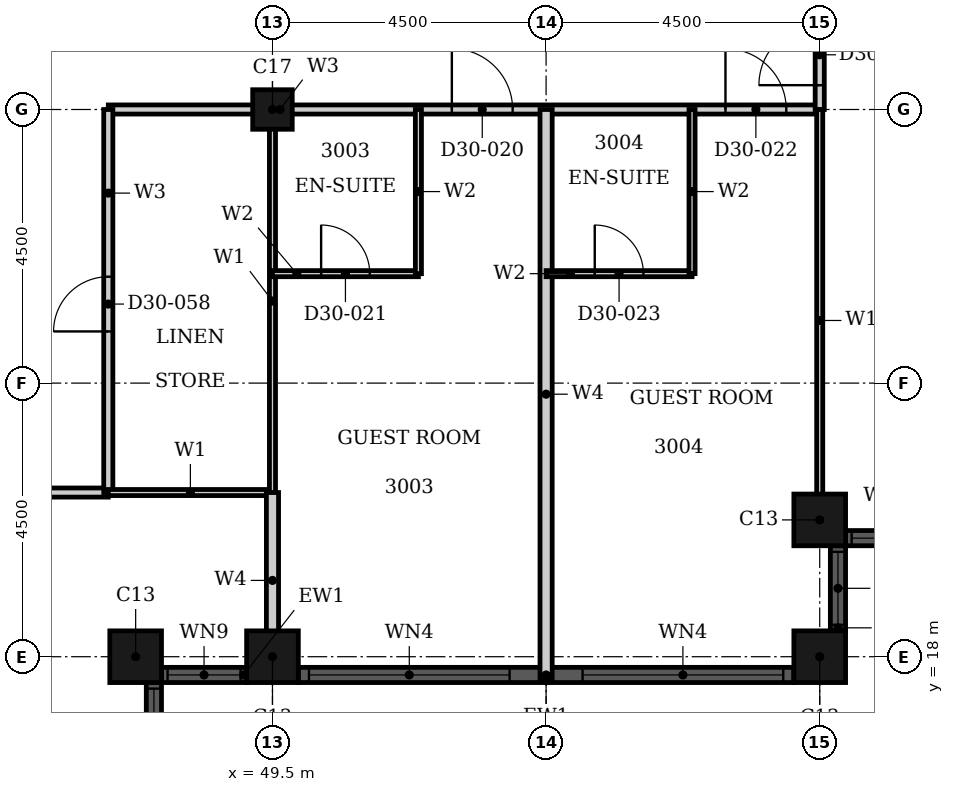
"""IFC4 building model, lengths in metres.
Left out: names, types, materials, properties, quantities, classifications, styles, units other than length and angle.
Written with IfcOpenShell. Run it as: python <this file> out.ifc"""

import sys

from ifc_helpers import new_model, si_unit, direction, frame, frame_2d, origin, origin_2d, place, context, subcontext, project, spatial, rectangle, hollow_rectangle, extrude, element, fill, save


model = new_model("IFC4")
c1 = context("Model", 3, precision=1e-05, world=origin(), true_north=direction((0.0, 1.0)))
c2 = subcontext(c1, "Body", "Model", "MODEL_VIEW")
j1 = project(units=[si_unit("LENGTHUNIT", "METRE"), si_unit("PLANEANGLEUNIT", "RADIAN")], contexts=[c1])
p1 = place(None, origin())
s1 = spatial("IfcSite", under=j1, at=p1, CompositionType="ELEMENT")
p2 = place(p1, origin())
s2 = spatial("IfcBuilding", under=s1, at=p2, CompositionType="ELEMENT")
p3 = place(p2, frame((0.0, 0.0, 122.4)))
s3 = spatial("IfcBuildingStorey", under=s2, at=p3, CompositionType="ELEMENT", Elevation=122.4)
for number, where, z_axis, x_axis in (
    (1, (47.25, 18.0, 0.0), (0.0, 0.0, 1.0), (1.0, 0.0, 0.0)),
    (2, (49.5, 18.0, 0.0), (0.0, 0.0, 1.0), (1.0, 0.0, 0.0)),
    (3, (58.5, 18.0, 0.0), (0.0, 0.0, 1.0), (1.0, 0.0, 0.0)),
    (4, (58.5, 20.25, 0.0), (0.0, 0.0, 1.0), (1.0, 0.0, 0.0)),
):
    element("IfcColumn", number, at=place(p3, frame(where, z_axis=z_axis, x_axis=x_axis)), inside=s3, PredefinedType="COLUMN", context=c2, shape_type="SweptSolid", body=[
        extrude(hollow_rectangle(XDim=0.85, YDim=0.85, WallThickness=0.026, at=origin_2d()), origin(), (0.0, 0.0, 1.0), 3.6),
    ])
p4 = place(p3, frame((49.5, 27.0, 0.0), z_axis=(0.0, 0.0, 1.0), x_axis=(1.0, 0.0, 0.0)))
e5 = element("IfcColumn", 5, at=p4, inside=s3, PredefinedType="COLUMN", context=c2, shape_type="SweptSolid", body=[
    extrude(hollow_rectangle(XDim=0.65, YDim=0.65, WallThickness=0.021, at=origin_2d()), origin(), (0.0, 0.0, 1.0), 3.6),
])
p5 = place(p3, frame((47.55, 16.175, 0.0), z_axis=(0.0, 0.0, 1.0), x_axis=(0.0, 1.0, 0.0)))
e6 = element("IfcWall", 6, at=p5, inside=s3, PredefinedType="SOLIDWALL", context=c2, shape_type="SweptSolid", body=[
    extrude(rectangle(XDim=1.4, YDim=0.25, at=frame_2d((0.7, 0.0))), origin(), (0.0, 0.0, 1.0), 3.6),
])
p6 = place(p5, frame((0.1, 0.0, 0.9)))
e7 = element("IfcOpeningElement", 7, at=p6, cuts=e6, PredefinedType="OPENING", context=c2, shape_type="SweptSolid", body=[
    extrude(rectangle(XDim=1.2, YDim=2.08, at=frame_2d((0.6, 1.04))), frame((0.0, 0.135, 0.0), z_axis=(0.0, -1.0, 0.0), x_axis=(1.0, 0.0, 0.0)), (0.0, 0.0, 1.0), 0.27),
])
p7 = place(p3, frame((47.675, 17.7, 0.0), z_axis=(0.0, 0.0, 1.0), x_axis=(1.0, 0.0, 0.0)))
e8 = element("IfcWall", 8, at=p7, inside=s3, PredefinedType="SOLIDWALL", context=c2, shape_type="SweptSolid", body=[
    extrude(rectangle(XDim=1.4, YDim=0.25, at=frame_2d((0.7, 0.0))), origin(), (0.0, 0.0, 1.0), 3.6),
])
p8 = place(p7, frame((0.1, 0.0, 0.9)))
e9 = element("IfcOpeningElement", 9, at=p8, cuts=e8, PredefinedType="OPENING", context=c2, shape_type="SweptSolid", body=[
    extrude(rectangle(XDim=1.2, YDim=2.08, at=frame_2d((0.6, 1.04))), frame((0.0, 0.135, 0.0), z_axis=(0.0, -1.0, 0.0), x_axis=(1.0, 0.0, 0.0)), (0.0, 0.0, 1.0), 0.27),
])
p9 = place(p3, frame((49.925, 17.7, 0.0), z_axis=(0.0, 0.0, 1.0), x_axis=(1.0, 0.0, 0.0)))
e10 = element("IfcWall", 10, at=p9, inside=s3, PredefinedType="SOLIDWALL", context=c2, shape_type="SweptSolid", body=[
    extrude(rectangle(XDim=8.15, YDim=0.25, at=frame_2d((4.075, 0.0))), origin(), (0.0, 0.0, 1.0), 3.6),
])
p10 = place(p9, frame((0.175, 0.0, 0.9)))
e11 = element("IfcOpeningElement", 11, at=p10, cuts=e10, PredefinedType="OPENING", context=c2, shape_type="SweptSolid", body=[
    extrude(rectangle(XDim=3.3, YDim=2.08, at=frame_2d((1.65, 1.04))), frame((0.0, 0.135, 0.0), z_axis=(0.0, -1.0, 0.0), x_axis=(1.0, 0.0, 0.0)), (0.0, 0.0, 1.0), 0.27),
])
p11 = place(p9, frame((4.675, 0.0, 0.9)))
e12 = element("IfcOpeningElement", 12, at=p11, cuts=e10, PredefinedType="OPENING", context=c2, shape_type="SweptSolid", body=[
    extrude(rectangle(XDim=3.3, YDim=2.08, at=frame_2d((1.65, 1.04))), frame((0.0, 0.135, 0.0), z_axis=(0.0, -1.0, 0.0), x_axis=(1.0, 0.0, 0.0)), (0.0, 0.0, 1.0), 0.27),
])
p12 = place(p3, frame((58.8, 18.425, 0.0), z_axis=(0.0, 0.0, 1.0), x_axis=(0.0, 1.0, 0.0)))
e13 = element("IfcWall", 13, at=p12, inside=s3, PredefinedType="SOLIDWALL", context=c2, shape_type="SweptSolid", body=[
    extrude(rectangle(XDim=1.4, YDim=0.25, at=frame_2d((0.7, 0.0))), origin(), (0.0, 0.0, 1.0), 3.6),
])
p13 = place(p12, frame((0.1, 0.0, 0.9)))
e14 = element("IfcOpeningElement", 14, at=p13, cuts=e13, PredefinedType="OPENING", context=c2, shape_type="SweptSolid", body=[
    extrude(rectangle(XDim=1.2, YDim=2.08, at=frame_2d((0.6, 1.04))), frame((0.0, 0.135, 0.0), z_axis=(0.0, -1.0, 0.0), x_axis=(1.0, 0.0, 0.0)), (0.0, 0.0, 1.0), 0.27),
])
p14 = place(p3, frame((58.925, 19.95, 0.0), z_axis=(0.0, 0.0, 1.0), x_axis=(1.0, 0.0, 0.0)))
e15 = element("IfcWall", 15, at=p14, inside=s3, PredefinedType="SOLIDWALL", context=c2, shape_type="SweptSolid", body=[
    extrude(rectangle(XDim=1.4, YDim=0.25, at=frame_2d((0.7, 0.0))), origin(), (0.0, 0.0, 1.0), 3.6),
])
p15 = place(p14, frame((0.1, 0.0, 0.9)))
e16 = element("IfcOpeningElement", 16, at=p15, cuts=e15, PredefinedType="OPENING", context=c2, shape_type="SweptSolid", body=[
    extrude(rectangle(XDim=1.2, YDim=2.08, at=frame_2d((0.6, 1.04))), frame((0.0, 0.135, 0.0), z_axis=(0.0, -1.0, 0.0), x_axis=(1.0, 0.0, 0.0)), (0.0, 0.0, 1.0), 0.27),
])
p16 = place(p3, frame((31.5, 20.7, 0.0), z_axis=(0.0, 0.0, 1.0), x_axis=(1.0, 0.0, 0.0)))
e17 = element("IfcWall", 17, at=p16, inside=s3, PredefinedType="PARTITIONING", context=c2, shape_type="SweptSolid", body=[
    extrude(rectangle(XDim=15.3, YDim=0.15, at=frame_2d((7.65, 0.0))), origin(), (0.0, 0.0, 1.0), 3.3),
])
p17 = place(p16, frame((11.95, 0.0, 0.0)))
e18 = element("IfcOpeningElement", 18, at=p17, cuts=e17, PredefinedType="OPENING", context=c2, shape_type="SweptSolid", body=[
    extrude(rectangle(XDim=1.0, YDim=2.1, at=frame_2d((0.5, 1.05))), frame((0.0, 0.085, 0.0), z_axis=(0.0, -1.0, 0.0), x_axis=(1.0, 0.0, 0.0)), (0.0, 0.0, 1.0), 0.17),
])
p18 = place(p16, frame((4.05, 0.0, 0.0)))
e19 = element("IfcOpeningElement", 19, at=p18, cuts=e17, PredefinedType="OPENING", context=c2, shape_type="SweptSolid", body=[
    extrude(rectangle(XDim=0.9, YDim=2.1, at=frame_2d((0.45, 1.05))), frame((0.0, 0.085, 0.0), z_axis=(0.0, -1.0, 0.0), x_axis=(1.0, 0.0, 0.0)), (0.0, 0.0, 1.0), 0.17),
])
p19 = place(p3, frame((46.8, 27.0, 0.0), z_axis=(0.0, 0.0, 1.0), x_axis=(1.0, 0.0, 0.0)))
e20 = element("IfcWall", 20, at=p19, inside=s3, PredefinedType="PARTITIONING", context=c2, shape_type="SweptSolid", body=[
    extrude(rectangle(XDim=11.7, YDim=0.15, at=frame_2d((5.85, 0.0))), origin(), (0.0, 0.0, 1.0), 2.58),
])
p20 = place(p19, frame((5.65, 0.0, 0.0)))
e21 = element("IfcOpeningElement", 21, at=p20, cuts=e20, PredefinedType="OPENING", context=c2, shape_type="SweptSolid", body=[
    extrude(rectangle(XDim=1.0, YDim=2.1, at=frame_2d((0.5, 1.05))), frame((0.0, 0.085, 0.0), z_axis=(0.0, -1.0, 0.0), x_axis=(1.0, 0.0, 0.0)), (0.0, 0.0, 1.0), 0.17),
])
p21 = place(p19, frame((10.15, 0.0, 0.0)))
e22 = element("IfcOpeningElement", 22, at=p21, cuts=e20, PredefinedType="OPENING", context=c2, shape_type="SweptSolid", body=[
    extrude(rectangle(XDim=1.0, YDim=2.1, at=frame_2d((0.5, 1.05))), frame((0.0, 0.085, 0.0), z_axis=(0.0, -1.0, 0.0), x_axis=(1.0, 0.0, 0.0)), (0.0, 0.0, 1.0), 0.17),
])
p22 = place(p3, frame((46.8, 20.7, 0.0), z_axis=(0.0, 0.0, 1.0), x_axis=(0.0, 1.0, 0.0)))
e23 = element("IfcWall", 23, at=p22, inside=s3, PredefinedType="PARTITIONING", context=c2, shape_type="SweptSolid", body=[
    extrude(rectangle(XDim=6.3, YDim=0.15, at=frame_2d((3.15, 0.0))), origin(), (0.0, 0.0, 1.0), 3.3),
])
p23 = place(p22, frame((2.65, 0.0, 0.0)))
e24 = element("IfcOpeningElement", 24, at=p23, cuts=e23, PredefinedType="OPENING", context=c2, shape_type="SweptSolid", body=[
    extrude(rectangle(XDim=0.9, YDim=2.1, at=frame_2d((0.45, 1.05))), frame((0.0, 0.085, 0.0), z_axis=(0.0, -1.0, 0.0), x_axis=(1.0, 0.0, 0.0)), (0.0, 0.0, 1.0), 0.17),
])
p24 = place(p3, frame((58.5, 27.0, 0.0), z_axis=(0.0, 0.0, 1.0), x_axis=(0.0, 1.0, 0.0)))
e25 = element("IfcWall", 25, at=p24, inside=s3, PredefinedType="PARTITIONING", context=c2, shape_type="SweptSolid", body=[
    extrude(rectangle(XDim=1.8, YDim=0.15, at=frame_2d((0.9, 0.0))), origin(), (0.0, 0.0, 1.0), 3.3),
])
p25 = place(p24, frame((0.4, 0.0, 0.0)))
e26 = element("IfcOpeningElement", 26, at=p25, cuts=e25, PredefinedType="OPENING", context=c2, shape_type="SweptSolid", body=[
    extrude(rectangle(XDim=1.0, YDim=2.1, at=frame_2d((0.5, 1.05))), frame((0.0, 0.085, 0.0), z_axis=(0.0, -1.0, 0.0), x_axis=(1.0, 0.0, 0.0)), (0.0, 0.0, 1.0), 0.17),
])
p26 = place(p3, frame((46.8, 20.7, 0.0), z_axis=(0.0, 0.0, 1.0), x_axis=(1.0, 0.0, 0.0)))
e27 = element("IfcWall", 27, at=p26, inside=s3, PredefinedType="PARTITIONING", context=c2, shape_type="SweptSolid", body=[
    extrude(rectangle(XDim=2.7, YDim=0.1, at=frame_2d((1.35, 0.0))), origin(), (0.0, 0.0, 1.0), 3.3),
])
p27 = place(p3, frame((49.5, 20.7, 0.0), z_axis=(0.0, 0.0, 1.0), x_axis=(0.0, 1.0, 0.0)))
e28 = element("IfcWall", 28, at=p27, inside=s3, PredefinedType="PARTITIONING", context=c2, shape_type="SweptSolid", body=[
    extrude(rectangle(XDim=6.3, YDim=0.1, at=frame_2d((3.15, 0.0))), origin(), (0.0, 0.0, 1.0), 2.38),
])
p28 = place(p3, frame((58.5, 20.06, 0.0), z_axis=(0.0, 0.0, 1.0), x_axis=(0.0, 1.0, 0.0)))
e29 = element("IfcWall", 29, at=p28, inside=s3, PredefinedType="PARTITIONING", context=c2, shape_type="SweptSolid", body=[
    extrude(rectangle(XDim=6.94, YDim=0.1, at=frame_2d((3.47, 0.0))), origin(), (0.0, 0.0, 1.0), 3.3),
])
p29 = place(p3, frame((49.5, 17.81, 0.0), z_axis=(0.0, 0.0, 1.0), x_axis=(0.0, 1.0, 0.0)))
e30 = element("IfcWall", 30, at=p29, inside=s3, PredefinedType="PARTITIONING", context=c2, shape_type="SweptSolid", body=[
    extrude(rectangle(XDim=2.89, YDim=0.2, at=frame_2d((1.445, 0.0))), origin(), (0.0, 0.0, 1.0), 2.38),
])
p30 = place(p3, frame((54.0, 17.635, 0.0), z_axis=(0.0, 0.0, 1.0), x_axis=(0.0, 1.0, 0.0)))
e31 = element("IfcWall", 31, at=p30, inside=s3, PredefinedType="PARTITIONING", context=c2, shape_type="SweptSolid", body=[
    extrude(rectangle(XDim=9.365, YDim=0.2, at=frame_2d((4.683, 0.0))), origin(), (0.0, 0.0, 1.0), 3.3),
])
p31 = place(p3, frame((49.5, 24.3, 0.0), z_axis=(0.0, 0.0, 1.0), x_axis=(1.0, 0.0, 0.0)))
e32 = element("IfcWall", 32, at=p31, inside=s3, PredefinedType="PARTITIONING", context=c2, shape_type="SweptSolid", body=[
    extrude(rectangle(XDim=2.4, YDim=0.1, at=frame_2d((1.2, 0.0))), origin(), (0.0, 0.0, 1.0), 3.3),
])
p32 = place(p31, frame((0.8, 0.0, 0.0)))
e33 = element("IfcOpeningElement", 33, at=p32, cuts=e32, PredefinedType="OPENING", context=c2, shape_type="SweptSolid", body=[
    extrude(rectangle(XDim=0.8, YDim=2.1, at=frame_2d((0.4, 1.05))), frame((0.0, 0.06, 0.0), z_axis=(0.0, -1.0, 0.0), x_axis=(1.0, 0.0, 0.0)), (0.0, 0.0, 1.0), 0.12),
])
p33 = place(p3, frame((54.0, 24.3, 0.0), z_axis=(0.0, 0.0, 1.0), x_axis=(1.0, 0.0, 0.0)))
e34 = element("IfcWall", 34, at=p33, inside=s3, PredefinedType="PARTITIONING", context=c2, shape_type="SweptSolid", body=[
    extrude(rectangle(XDim=2.4, YDim=0.1, at=frame_2d((1.2, 0.0))), origin(), (0.0, 0.0, 1.0), 3.3),
])
p34 = place(p33, frame((0.8, 0.0, 0.0)))
e35 = element("IfcOpeningElement", 35, at=p34, cuts=e34, PredefinedType="OPENING", context=c2, shape_type="SweptSolid", body=[
    extrude(rectangle(XDim=0.8, YDim=2.1, at=frame_2d((0.4, 1.05))), frame((0.0, 0.06, 0.0), z_axis=(0.0, -1.0, 0.0), x_axis=(1.0, 0.0, 0.0)), (0.0, 0.0, 1.0), 0.12),
])
for number, where, z_axis, x_axis in (
    (36, (51.9, 24.3, 0.0), (0.0, 0.0, 1.0), (0.0, 1.0, 0.0)),
    (37, (56.4, 24.3, 0.0), (0.0, 0.0, 1.0), (0.0, 1.0, 0.0)),
):
    element("IfcWall", number, at=place(p3, frame(where, z_axis=z_axis, x_axis=x_axis)), inside=s3, PredefinedType="PARTITIONING", context=c2, shape_type="SweptSolid", body=[
        extrude(rectangle(XDim=2.7, YDim=0.1, at=frame_2d((1.35, 0.0))), origin(), (0.0, 0.0, 1.0), 3.3),
    ])
p35 = place(p6, origin())
e38 = element("IfcWindow", 38, at=p35, inside=s3, PartitioningType="SINGLE_PANEL", PredefinedType="WINDOW", context=c2, shape_type="SweptSolid", body=[
    extrude(rectangle(XDim=1.2, YDim=2.08, at=frame_2d((0.6, 1.04))), frame((0.0, 0.03, 0.0), z_axis=(0.0, -1.0, 0.0), x_axis=(1.0, 0.0, 0.0)), (0.0, 0.0, 1.0), 0.06),
])
fill(e7, e38)
p36 = place(p8, origin())
e39 = element("IfcWindow", 39, at=p36, inside=s3, PartitioningType="SINGLE_PANEL", PredefinedType="WINDOW", context=c2, shape_type="SweptSolid", body=[
    extrude(rectangle(XDim=1.2, YDim=2.08, at=frame_2d((0.6, 1.04))), frame((0.0, 0.03, 0.0), z_axis=(0.0, -1.0, 0.0), x_axis=(1.0, 0.0, 0.0)), (0.0, 0.0, 1.0), 0.06),
])
fill(e9, e39)
p37 = place(p10, origin())
e40 = element("IfcWindow", 40, at=p37, inside=s3, PartitioningType="SINGLE_PANEL", PredefinedType="WINDOW", context=c2, shape_type="SweptSolid", body=[
    extrude(rectangle(XDim=3.3, YDim=2.08, at=frame_2d((1.65, 1.04))), frame((0.0, 0.03, 0.0), z_axis=(0.0, -1.0, 0.0), x_axis=(1.0, 0.0, 0.0)), (0.0, 0.0, 1.0), 0.06),
])
fill(e11, e40)
p38 = place(p11, origin())
e41 = element("IfcWindow", 41, at=p38, inside=s3, PartitioningType="SINGLE_PANEL", PredefinedType="WINDOW", context=c2, shape_type="SweptSolid", body=[
    extrude(rectangle(XDim=3.3, YDim=2.08, at=frame_2d((1.65, 1.04))), frame((0.0, 0.03, 0.0), z_axis=(0.0, -1.0, 0.0), x_axis=(1.0, 0.0, 0.0)), (0.0, 0.0, 1.0), 0.06),
])
fill(e12, e41)
p39 = place(p13, origin())
e42 = element("IfcWindow", 42, at=p39, inside=s3, PartitioningType="SINGLE_PANEL", PredefinedType="WINDOW", context=c2, shape_type="SweptSolid", body=[
    extrude(rectangle(XDim=1.2, YDim=2.08, at=frame_2d((0.6, 1.04))), frame((0.0, 0.03, 0.0), z_axis=(0.0, -1.0, 0.0), x_axis=(1.0, 0.0, 0.0)), (0.0, 0.0, 1.0), 0.06),
])
fill(e14, e42)
p40 = place(p15, origin())
e43 = element("IfcWindow", 43, at=p40, inside=s3, PartitioningType="SINGLE_PANEL", PredefinedType="WINDOW", context=c2, shape_type="SweptSolid", body=[
    extrude(rectangle(XDim=1.2, YDim=2.08, at=frame_2d((0.6, 1.04))), frame((0.0, 0.03, 0.0), z_axis=(0.0, -1.0, 0.0), x_axis=(1.0, 0.0, 0.0)), (0.0, 0.0, 1.0), 0.06),
])
fill(e16, e43)
p41 = place(p20, origin())
e44 = element("IfcDoor", 44, at=p41, inside=s3, OperationType="SINGLE_SWING_RIGHT", PredefinedType="DOOR", context=c2, shape_type="SweptSolid", body=[
    extrude(rectangle(XDim=1.0, YDim=2.1, at=frame_2d((0.5, 1.05))), frame((0.0, 0.025, 0.0), z_axis=(0.0, -1.0, 0.0), x_axis=(1.0, 0.0, 0.0)), (0.0, 0.0, 1.0), 0.05),
])
fill(e21, e44)
p42 = place(p32, origin())
e45 = element("IfcDoor", 45, at=p42, inside=s3, OperationType="SINGLE_SWING_RIGHT", PredefinedType="DOOR", context=c2, shape_type="SweptSolid", body=[
    extrude(rectangle(XDim=0.8, YDim=2.1, at=frame_2d((0.4, 1.05))), frame((0.0, 0.025, 0.0), z_axis=(0.0, -1.0, 0.0), x_axis=(1.0, 0.0, 0.0)), (0.0, 0.0, 1.0), 0.05),
])
fill(e33, e45)
p43 = place(p21, origin())
e46 = element("IfcDoor", 46, at=p43, inside=s3, OperationType="SINGLE_SWING_RIGHT", PredefinedType="DOOR", context=c2, shape_type="SweptSolid", body=[
    extrude(rectangle(XDim=1.0, YDim=2.1, at=frame_2d((0.5, 1.05))), frame((0.0, 0.025, 0.0), z_axis=(0.0, -1.0, 0.0), x_axis=(1.0, 0.0, 0.0)), (0.0, 0.0, 1.0), 0.05),
])
fill(e22, e46)
p44 = place(p34, origin())
e47 = element("IfcDoor", 47, at=p44, inside=s3, OperationType="SINGLE_SWING_LEFT", PredefinedType="DOOR", context=c2, shape_type="SweptSolid", body=[
    extrude(rectangle(XDim=0.8, YDim=2.1, at=frame_2d((0.4, 1.05))), frame((0.0, 0.025, 0.0), z_axis=(0.0, -1.0, 0.0), x_axis=(1.0, 0.0, 0.0)), (0.0, 0.0, 1.0), 0.05),
])
fill(e35, e47)
p45 = place(p25, origin())
e48 = element("IfcDoor", 48, at=p45, inside=s3, OperationType="SINGLE_SWING_LEFT", PredefinedType="DOOR", context=c2, shape_type="SweptSolid", body=[
    extrude(rectangle(XDim=1.0, YDim=2.1, at=frame_2d((0.5, 1.05))), frame((0.0, 0.025, 0.0), z_axis=(0.0, -1.0, 0.0), x_axis=(1.0, 0.0, 0.0)), (0.0, 0.0, 1.0), 0.05),
])
fill(e26, e48)
p46 = place(p23, origin())
e49 = element("IfcDoor", 49, at=p46, inside=s3, OperationType="SINGLE_SWING_LEFT", PredefinedType="DOOR", context=c2, shape_type="SweptSolid", body=[
    extrude(rectangle(XDim=0.9, YDim=2.1, at=frame_2d((0.45, 1.05))), frame((0.0, 0.025, 0.0), z_axis=(0.0, -1.0, 0.0), x_axis=(1.0, 0.0, 0.0)), (0.0, 0.0, 1.0), 0.05),
])
fill(e24, e49)
save(model, sys.argv[1])
